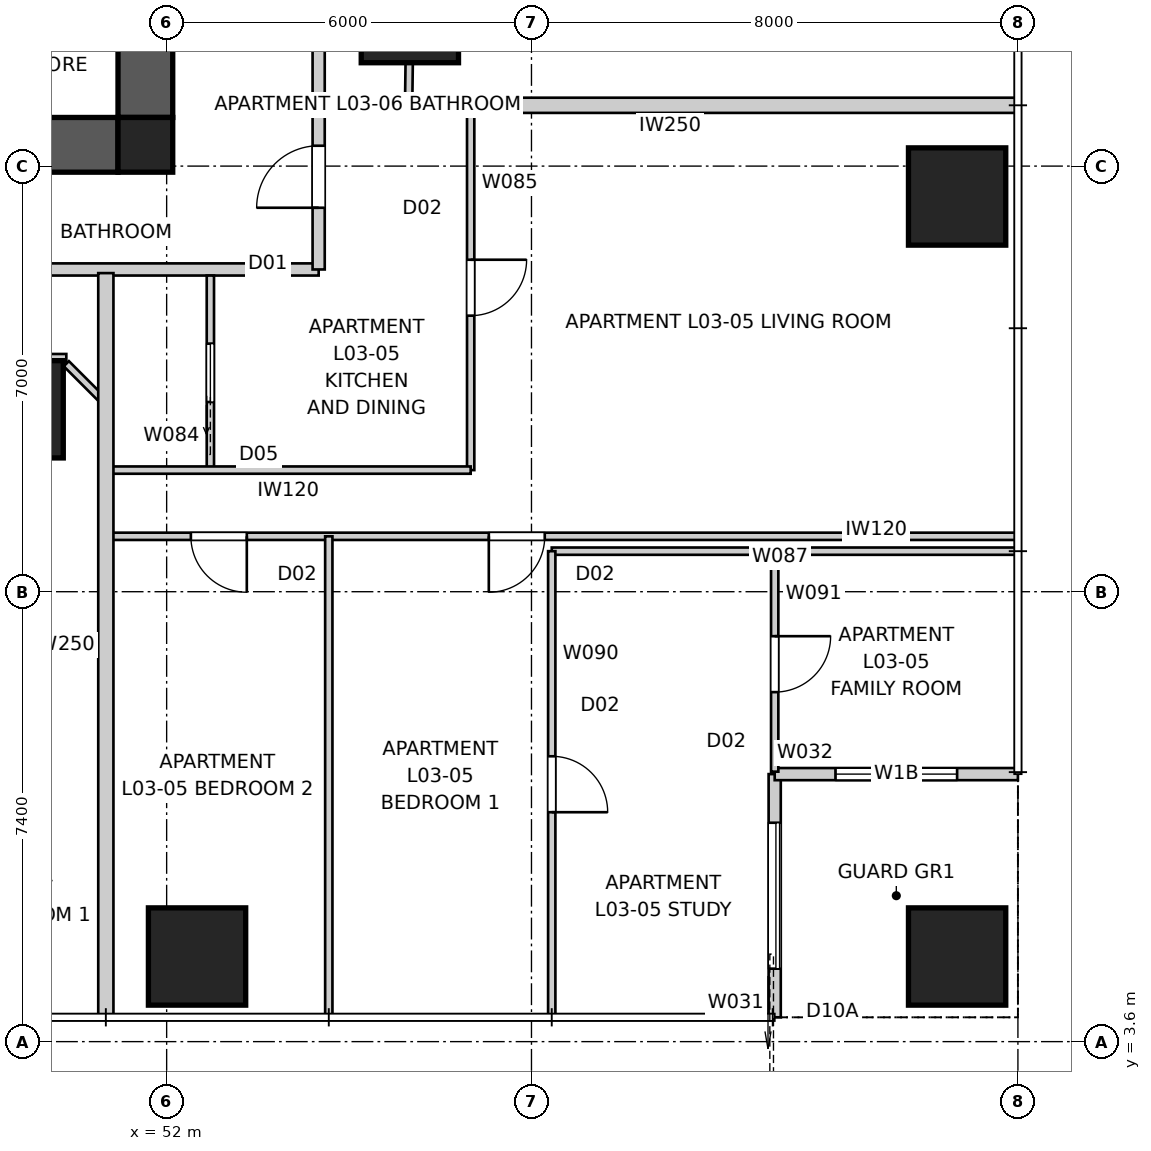
"""IFC4 building model, lengths in metres.
Left out: names, types, materials, properties, quantities, classifications, styles, units other than length and angle.
Written with IfcOpenShell. Run it as: python <this file> out.ifc"""

import sys

from ifc_helpers import new_model, si_unit, direction, frame, frame_2d, origin, origin_2d, place, context, subcontext, project, spatial, polyline, rectangle, outline, extrude, element, fill, save


model = new_model("IFC4")
c1 = context("Model", 3, precision=1e-05, world=origin(), true_north=direction((0.0, 1.0)))
c2 = subcontext(c1, "Body", "Model", "MODEL_VIEW")
j1 = project(units=[si_unit("LENGTHUNIT", "METRE"), si_unit("PLANEANGLEUNIT", "RADIAN")], contexts=[c1])
p1 = place(None, origin())
s1 = spatial("IfcSite", under=j1, at=p1, CompositionType="ELEMENT")
p2 = place(p1, origin())
s2 = spatial("IfcBuilding", under=s1, at=p2, CompositionType="ELEMENT")
p3 = place(p2, frame((0.0, 0.0, 15.0)))
s3 = spatial("IfcBuildingStorey", under=s2, at=p3, CompositionType="ELEMENT", Elevation=15.0)
p4 = place(p3, frame((51.2, 18.35, 0.0), z_axis=(0.0, 0.0, 1.0), x_axis=(-1.0, 0.0, 0.0)))
e1 = element("IfcWall", 1, at=p4, inside=s3, PredefinedType="SHEAR", context=c2, shape_type="SweptSolid", body=[
    extrude(outline(polyline([(0.0, -0.45), (22.4, -0.45), (22.4, -0.025), (22.85, -0.025), (22.85, 0.025), (22.4, 0.025), (22.4, 0.45), (0.0, 0.45), (0.0, 0.025), (-0.45, 0.025), (-0.45, -0.025), (0.0, -0.025), (0.0, -0.45)])), origin(), (0.0, 0.0, 1.0), 3.4),
])
p5 = place(p3, frame((51.65, 18.8, 0.0), z_axis=(0.0, 0.0, 1.0), x_axis=(0.0, 1.0, 0.0)))
e2 = element("IfcWall", 2, at=p5, inside=s3, PredefinedType="SHEAR", context=c2, shape_type="SweptSolid", body=[
    extrude(outline(polyline([(0.0, -0.45), (22.4, -0.45), (22.4, -0.025), (22.85, -0.025), (22.85, 0.025), (22.4, 0.025), (22.4, 0.45), (0.0, 0.45), (0.0, 0.025), (-0.45, 0.025), (-0.45, -0.025), (0.0, -0.025), (0.0, -0.45)])), origin(), (0.0, 0.0, 1.0), 3.4),
])
p6 = place(p5, frame((11.14, 0.0, 0.0)))
e3 = element("IfcOpeningElement", 3, at=p6, cuts=e2, PredefinedType="OPENING", context=c2, shape_type="SweptSolid", body=[
    extrude(rectangle(XDim=1.02, YDim=2.4, at=frame_2d((0.51, 1.2))), frame((0.0, 0.46, 0.0), z_axis=(0.0, -1.0, 0.0), x_axis=(1.0, 0.0, 0.0)), (0.0, 0.0, 1.0), 0.92),
])
p7 = place(p3, frame((51.65, 18.35, 0.0), z_axis=(0.0, 0.0, 1.0), x_axis=(1.0, 0.0, 0.0)))
e4 = element("IfcColumn", 4, at=p7, inside=s3, PredefinedType="COLUMN", context=c2, shape_type="SweptSolid", body=[
    extrude(rectangle(XDim=0.9, YDim=0.9, at=origin_2d()), origin(), (0.0, 0.0, 1.0), 3.4),
])
for number, where, z_axis, x_axis in (
    (5, (52.5, 5.0, 0.0), (0.0, 0.0, 1.0), (1.0, 0.0, 0.0)),
    (6, (65.0, 5.0, 0.0), (0.0, 0.0, 1.0), (1.0, 0.0, 0.0)),
    (7, (65.0, 17.5, 0.0), (0.0, 0.0, 1.0), (1.0, 0.0, 0.0)),
    (8, (49.5, 14.0, 0.0), (0.0, 0.0, 1.0), (1.0, 0.0, 0.0)),
    (9, (56.0, 20.5, 0.0), (0.0, 0.0, 1.0), (1.0, 0.0, 0.0)),
):
    element("IfcColumn", number, at=place(p3, frame(where, z_axis=z_axis, x_axis=x_axis)), inside=s3, PredefinedType="COLUMN", context=c2, shape_type="SweptSolid", body=[
        extrude(rectangle(XDim=1.6, YDim=1.6, at=origin_2d()), origin(), (0.0, 0.0, 1.0), 3.4),
    ])
p8 = place(p3, frame((62.0, 4.0, 0.0), z_axis=(0.0, 0.0, 1.0), x_axis=(0.0, 1.0, 0.0)))
e10 = element("IfcWall", 10, at=p8, inside=s3, PredefinedType="SOLIDWALL", context=c2, shape_type="SweptSolid", body=[
    extrude(rectangle(XDim=4.0, YDim=0.2, at=frame_2d((2.0, 0.0))), origin(), (0.0, 0.0, 1.0), 3.25),
])
p9 = place(p8, frame((0.8, 0.0, 0.0)))
e11 = element("IfcOpeningElement", 11, at=p9, cuts=e10, PredefinedType="OPENING", context=c2, shape_type="SweptSolid", body=[
    extrude(rectangle(XDim=2.4, YDim=2.1, at=frame_2d((1.2, 1.05))), frame((0.0, 0.11, 0.0), z_axis=(0.0, -1.0, 0.0), x_axis=(1.0, 0.0, 0.0)), (0.0, 0.0, 1.0), 0.22),
])
p10 = place(p3, frame((62.0, 8.0, 0.0), z_axis=(0.0, 0.0, 1.0), x_axis=(1.0, 0.0, 0.0)))
e12 = element("IfcWall", 12, at=p10, inside=s3, PredefinedType="SOLIDWALL", context=c2, shape_type="SweptSolid", body=[
    extrude(rectangle(XDim=4.0, YDim=0.2, at=frame_2d((2.0, 0.0))), origin(), (0.0, 0.0, 1.0), 3.25),
])
p11 = place(p10, frame((1.0, 0.0, 0.45)))
e13 = element("IfcOpeningElement", 13, at=p11, cuts=e12, PredefinedType="OPENING", context=c2, shape_type="SweptSolid", body=[
    extrude(rectangle(XDim=2.0, YDim=1.8, at=frame_2d((1.0, 0.9))), frame((0.0, 0.11, 0.0), z_axis=(0.0, -1.0, 0.0), x_axis=(1.0, 0.0, 0.0)), (0.0, 0.0, 1.0), 0.22),
])
p12 = place(p3, frame((25.5, 16.3, 0.0), z_axis=(0.0, 0.0, 1.0), x_axis=(1.0, 0.0, 0.0)))
e14 = element("IfcWall", 14, at=p12, inside=s3, PredefinedType="PARTITIONING", context=c2, shape_type="SweptSolid", body=[
    extrude(rectangle(XDim=29.0, YDim=0.2, at=frame_2d((14.5, 0.0))), origin(), (0.0, 0.0, 1.0), 3.25),
])
p13 = place(p12, frame((18.734, 0.0, 0.0)))
e15 = element("IfcOpeningElement", 15, at=p13, cuts=e14, PredefinedType="OPENING", context=c2, shape_type="SweptSolid", body=[
    extrude(rectangle(XDim=1.02, YDim=2.34, at=frame_2d((0.51, 1.17))), frame((0.0, 0.11, 0.0), z_axis=(0.0, -1.0, 0.0), x_axis=(1.0, 0.0, 0.0)), (0.0, 0.0, 1.0), 0.22),
])
p14 = place(p12, frame((5.096, 0.0, 0.0)))
e16 = element("IfcOpeningElement", 16, at=p14, cuts=e14, PredefinedType="OPENING", context=c2, shape_type="SweptSolid", body=[
    extrude(rectangle(XDim=1.02, YDim=2.34, at=frame_2d((0.51, 1.17))), frame((0.0, 0.11, 0.0), z_axis=(0.0, -1.0, 0.0), x_axis=(1.0, 0.0, 0.0)), (0.0, 0.0, 1.0), 0.22),
])
p15 = place(p12, frame((0.815, 0.0, 0.0)))
e17 = element("IfcOpeningElement", 17, at=p15, cuts=e14, PredefinedType="OPENING", context=c2, shape_type="SweptSolid", body=[
    extrude(rectangle(XDim=1.02, YDim=2.1, at=frame_2d((0.51, 1.05))), frame((0.0, 0.11, 0.0), z_axis=(0.0, -1.0, 0.0), x_axis=(1.0, 0.0, 0.0)), (0.0, 0.0, 1.0), 0.22),
])
p16 = place(p3, frame((54.5, 16.3, 0.0), z_axis=(0.0, 0.0, 1.0), x_axis=(0.0, 1.0, 0.0)))
e18 = element("IfcWall", 18, at=p16, inside=s3, PredefinedType="PARTITIONING", context=c2, shape_type="SweptSolid", body=[
    extrude(rectangle(XDim=27.4, YDim=0.2, at=frame_2d((13.7, 0.0))), origin(), (0.0, 0.0, 1.0), 3.25),
])
p17 = place(p16, frame((20.998, 0.0, 0.0)))
e19 = element("IfcOpeningElement", 19, at=p17, cuts=e18, PredefinedType="OPENING", context=c2, shape_type="SweptSolid", body=[
    extrude(rectangle(XDim=1.02, YDim=2.34, at=frame_2d((0.51, 1.17))), frame((0.0, 0.11, 0.0), z_axis=(0.0, -1.0, 0.0), x_axis=(1.0, 0.0, 0.0)), (0.0, 0.0, 1.0), 0.22),
])
p18 = place(p16, frame((11.119, 0.0, 0.0)))
e20 = element("IfcOpeningElement", 20, at=p18, cuts=e18, PredefinedType="OPENING", context=c2, shape_type="SweptSolid", body=[
    extrude(rectangle(XDim=1.02, YDim=2.34, at=frame_2d((0.51, 1.17))), frame((0.0, 0.11, 0.0), z_axis=(0.0, -1.0, 0.0), x_axis=(1.0, 0.0, 0.0)), (0.0, 0.0, 1.0), 0.22),
])
p19 = place(p16, frame((1.015, 0.0, 0.0)))
e21 = element("IfcOpeningElement", 21, at=p19, cuts=e18, PredefinedType="OPENING", context=c2, shape_type="SweptSolid", body=[
    extrude(rectangle(XDim=1.02, YDim=2.34, at=frame_2d((0.51, 1.17))), frame((0.0, 0.11, 0.0), z_axis=(0.0, -1.0, 0.0), x_axis=(1.0, 0.0, 0.0)), (0.0, 0.0, 1.0), 0.22),
])
p20 = place(p3, frame((51.0, 4.0, 0.0), z_axis=(0.0, 0.0, 1.0), x_axis=(0.0, 1.0, 0.0)))
e22 = element("IfcWall", 22, at=p20, inside=s3, PredefinedType="PARTITIONING", context=c2, shape_type="SweptSolid", body=[
    extrude(rectangle(XDim=12.24, YDim=0.25, at=frame_2d((6.12, 0.0))), origin(), (0.0, 0.0, 1.0), 3.25),
])
p21 = place(p3, frame((66.0, 19.0, 0.0), z_axis=(0.0, 0.0, 1.0), x_axis=(-1.0, 0.0, 0.0)))
e23 = element("IfcWall", 23, at=p21, inside=s3, PredefinedType="PARTITIONING", context=c2, shape_type="SweptSolid", body=[
    extrude(rectangle(XDim=11.44, YDim=0.25, at=frame_2d((5.72, 0.0))), origin(), (0.0, 0.0, 1.0), 3.25),
])
p22 = place(p3, frame((51.0, 14.1, 0.0), z_axis=(0.0, 0.0, 1.0), x_axis=(-0.707106781187, 0.707106781187, 0.0)))
e24 = element("IfcWall", 24, at=p22, inside=s3, PredefinedType="PARTITIONING", context=c2, shape_type="SweptSolid", body=[
    extrude(rectangle(XDim=0.919, YDim=0.12, at=frame_2d((0.459, 0.0))), origin(), (0.0, 0.0, 1.0), 3.25),
])
p23 = place(p3, frame((50.35, 14.85, 0.0), z_axis=(0.0, 0.0, 1.0), x_axis=(-1.0, 0.0, 0.0)))
e25 = element("IfcWall", 25, at=p23, inside=s3, PredefinedType="PARTITIONING", context=c2, shape_type="SweptSolid", body=[
    extrude(rectangle(XDim=1.7, YDim=0.12, at=frame_2d((0.85, 0.0))), origin(), (0.0, 0.0, 1.0), 3.25),
])
p24 = place(p3, frame((52.719, 13.0, 0.0), z_axis=(0.0, 0.0, 1.0), x_axis=(0.0, 1.0, 0.0)))
e26 = element("IfcWall", 26, at=p24, inside=s3, PredefinedType="PARTITIONING", context=c2, shape_type="SweptSolid", body=[
    extrude(rectangle(XDim=3.2, YDim=0.12, at=frame_2d((1.6, 0.0))), origin(), (0.0, 0.0, 1.0), 3.25),
])
p25 = place(p24, frame((1.12, 0.0, 0.0)))
e27 = element("IfcOpeningElement", 27, at=p25, cuts=e26, PredefinedType="OPENING", context=c2, shape_type="SweptSolid", body=[
    extrude(rectangle(XDim=0.96, YDim=2.1, at=frame_2d((0.48, 1.05))), frame((0.0, 0.07, 0.0), z_axis=(0.0, -1.0, 0.0), x_axis=(1.0, 0.0, 0.0)), (0.0, 0.0, 1.0), 0.14),
])
p26 = place(p3, frame((57.0, 19.0, 0.0), z_axis=(0.0, 0.0, 1.0), x_axis=(0.0, -1.0, 0.0)))
e28 = element("IfcWall", 28, at=p26, inside=s3, PredefinedType="PARTITIONING", context=c2, shape_type="SweptSolid", body=[
    extrude(rectangle(XDim=6.0, YDim=0.12, at=frame_2d((3.0, 0.0))), origin(), (0.0, 0.0, 1.0), 3.25),
])
p27 = place(p26, frame((2.54, 0.0, 0.0)))
e29 = element("IfcOpeningElement", 29, at=p27, cuts=e28, PredefinedType="OPENING", context=c2, shape_type="SweptSolid", body=[
    extrude(rectangle(XDim=0.92, YDim=2.34, at=frame_2d((0.46, 1.17))), frame((0.0, 0.07, 0.0), z_axis=(0.0, -1.0, 0.0), x_axis=(1.0, 0.0, 0.0)), (0.0, 0.0, 1.0), 0.14),
])
p28 = place(p3, frame((57.0, 13.0, 0.0), z_axis=(0.0, 0.0, 1.0), x_axis=(-1.0, 0.0, 0.0)))
e30 = element("IfcWall", 30, at=p28, inside=s3, PredefinedType="PARTITIONING", context=c2, shape_type="SweptSolid", body=[
    extrude(rectangle(XDim=6.0, YDim=0.12, at=frame_2d((3.0, 0.0))), origin(), (0.0, 0.0, 1.0), 3.25),
])
p29 = place(p3, frame((65.96, 11.911, 0.0), z_axis=(0.0, 0.0, 1.0), x_axis=(-1.0, 0.0, 0.0)))
e31 = element("IfcWall", 31, at=p29, inside=s3, PredefinedType="PARTITIONING", context=c2, shape_type="SweptSolid", body=[
    extrude(rectangle(XDim=14.96, YDim=0.12, at=frame_2d((7.48, 0.0))), origin(), (0.0, 0.0, 1.0), 3.25),
])
p30 = place(p29, frame((7.742, 0.0, 0.0)))
e32 = element("IfcOpeningElement", 32, at=p30, cuts=e31, PredefinedType="OPENING", context=c2, shape_type="SweptSolid", body=[
    extrude(rectangle(XDim=0.92, YDim=2.34, at=frame_2d((0.46, 1.17))), frame((0.0, 0.07, 0.0), z_axis=(0.0, -1.0, 0.0), x_axis=(1.0, 0.0, 0.0)), (0.0, 0.0, 1.0), 0.14),
])
p31 = place(p29, frame((12.642, 0.0, 0.0)))
e33 = element("IfcOpeningElement", 33, at=p31, cuts=e31, PredefinedType="OPENING", context=c2, shape_type="SweptSolid", body=[
    extrude(rectangle(XDim=0.92, YDim=2.34, at=frame_2d((0.46, 1.17))), frame((0.0, 0.07, 0.0), z_axis=(0.0, -1.0, 0.0), x_axis=(1.0, 0.0, 0.0)), (0.0, 0.0, 1.0), 0.14),
])
p32 = place(p3, frame((54.667, 4.04, 0.0), z_axis=(0.0, 0.0, 1.0), x_axis=(0.0, 1.0, 0.0)))
e34 = element("IfcWall", 34, at=p32, inside=s3, PredefinedType="PARTITIONING", context=c2, shape_type="SweptSolid", body=[
    extrude(rectangle(XDim=7.871, YDim=0.12, at=frame_2d((3.936, 0.0))), origin(), (0.0, 0.0, 1.0), 2.637),
])
p33 = place(p3, frame((65.96, 11.667, 0.0), z_axis=(0.0, 0.0, 1.0), x_axis=(-1.0, 0.0, 0.0)))
e35 = element("IfcWall", 35, at=p33, inside=s3, PredefinedType="PARTITIONING", context=c2, shape_type="SweptSolid", body=[
    extrude(rectangle(XDim=7.627, YDim=0.12, at=frame_2d((3.813, 0.0))), origin(), (0.0, 0.0, 1.0), 3.25),
])
p34 = place(p3, frame((58.333, 11.667, 0.0), z_axis=(0.0, 0.0, 1.0), x_axis=(0.0, -1.0, 0.0)))
e36 = element("IfcWall", 36, at=p34, inside=s3, PredefinedType="PARTITIONING", context=c2, shape_type="SweptSolid", body=[
    extrude(rectangle(XDim=7.627, YDim=0.12, at=frame_2d((3.813, 0.0))), origin(), (0.0, 0.0, 1.0), 3.25),
])
p35 = place(p34, frame((3.373, 0.0, 0.0)))
e37 = element("IfcOpeningElement", 37, at=p35, cuts=e36, PredefinedType="OPENING", context=c2, shape_type="SweptSolid", body=[
    extrude(rectangle(XDim=0.92, YDim=2.34, at=frame_2d((0.46, 1.17))), frame((0.0, 0.07, 0.0), z_axis=(0.0, -1.0, 0.0), x_axis=(1.0, 0.0, 0.0)), (0.0, 0.0, 1.0), 0.14),
])
p36 = place(p3, frame((62.0, 11.667, 0.0), z_axis=(0.0, 0.0, 1.0), x_axis=(0.0, -1.0, 0.0)))
e38 = element("IfcWall", 38, at=p36, inside=s3, PredefinedType="PARTITIONING", context=c2, shape_type="SweptSolid", body=[
    extrude(rectangle(XDim=3.627, YDim=0.12, at=frame_2d((1.813, 0.0))), origin(), (0.0, 0.0, 1.0), 3.25),
])
p37 = place(p36, frame((1.398, 0.0, 0.0)))
e39 = element("IfcOpeningElement", 39, at=p37, cuts=e38, PredefinedType="OPENING", context=c2, shape_type="SweptSolid", body=[
    extrude(rectangle(XDim=0.92, YDim=2.34, at=frame_2d((0.46, 1.17))), frame((0.0, 0.07, 0.0), z_axis=(0.0, -1.0, 0.0), x_axis=(1.0, 0.0, 0.0)), (0.0, 0.0, 1.0), 0.14),
])
p38 = place(p3, frame((56.029, 22.649, 0.0), z_axis=(0.0, 0.0, 1.0), x_axis=(-0.013648778697, -0.999906851082, 0.0)))
e40 = element("IfcWall", 40, at=p38, inside=s3, PredefinedType="PARTITIONING", context=c2, shape_type="SweptSolid", body=[
    extrude(rectangle(XDim=3.649, YDim=0.12, at=frame_2d((1.824, 0.0))), origin(), (0.0, 0.0, 1.0), 2.549),
])
p39 = place(p9, origin())
e41 = element("IfcDoor", 41, at=p39, inside=s3, OperationType="SLIDING_TO_LEFT", PredefinedType="DOOR", context=c2, shape_type="SweptSolid", body=[
    extrude(rectangle(XDim=2.4, YDim=2.1, at=frame_2d((1.2, 1.05))), frame((0.0, 0.025, 0.0), z_axis=(0.0, -1.0, 0.0), x_axis=(1.0, 0.0, 0.0)), (0.0, 0.0, 1.0), 0.05),
])
fill(e11, e41)
p40 = place(p11, origin())
e42 = element("IfcWindow", 42, at=p40, inside=s3, PartitioningType="SINGLE_PANEL", PredefinedType="WINDOW", context=c2, shape_type="SweptSolid", body=[
    extrude(rectangle(XDim=2.0, YDim=1.8, at=frame_2d((1.0, 0.9))), frame((0.0, 0.03, 0.0), z_axis=(0.0, -1.0, 0.0), x_axis=(1.0, 0.0, 0.0)), (0.0, 0.0, 1.0), 0.06),
])
fill(e13, e42)
p41 = place(p19, origin())
e43 = element("IfcDoor", 43, at=p41, inside=s3, OperationType="SINGLE_SWING_LEFT", PredefinedType="DOOR", context=c2, shape_type="SweptSolid", body=[
    extrude(rectangle(XDim=1.02, YDim=2.34, at=frame_2d((0.51, 1.17))), frame((0.0, 0.025, 0.0), z_axis=(0.0, -1.0, 0.0), x_axis=(1.0, 0.0, 0.0)), (0.0, 0.0, 1.0), 0.05),
])
fill(e21, e43)
p42 = place(p27, origin())
e44 = element("IfcDoor", 44, at=p42, inside=s3, OperationType="SINGLE_SWING_LEFT", PredefinedType="DOOR", context=c2, shape_type="SweptSolid", body=[
    extrude(rectangle(XDim=0.92, YDim=2.34, at=frame_2d((0.46, 1.17))), frame((0.0, 0.025, 0.0), z_axis=(0.0, -1.0, 0.0), x_axis=(1.0, 0.0, 0.0)), (0.0, 0.0, 1.0), 0.05),
])
fill(e29, e44)
p43 = place(p25, origin())
e45 = element("IfcDoor", 45, at=p43, inside=s3, OperationType="SLIDING_TO_LEFT", PredefinedType="DOOR", context=c2, shape_type="SweptSolid", body=[
    extrude(rectangle(XDim=0.96, YDim=2.1, at=frame_2d((0.48, 1.05))), frame((0.0, 0.025, 0.0), z_axis=(0.0, -1.0, 0.0), x_axis=(1.0, 0.0, 0.0)), (0.0, 0.0, 1.0), 0.05),
])
fill(e27, e45)
p44 = place(p30, origin())
e46 = element("IfcDoor", 46, at=p44, inside=s3, OperationType="SINGLE_SWING_RIGHT", PredefinedType="DOOR", context=c2, shape_type="SweptSolid", body=[
    extrude(rectangle(XDim=0.92, YDim=2.34, at=frame_2d((0.46, 1.17))), frame((0.0, 0.025, 0.0), z_axis=(0.0, -1.0, 0.0), x_axis=(1.0, 0.0, 0.0)), (0.0, 0.0, 1.0), 0.05),
])
fill(e32, e46)
p45 = place(p31, origin())
e47 = element("IfcDoor", 47, at=p45, inside=s3, OperationType="SINGLE_SWING_LEFT", PredefinedType="DOOR", context=c2, shape_type="SweptSolid", body=[
    extrude(rectangle(XDim=0.92, YDim=2.34, at=frame_2d((0.46, 1.17))), frame((0.0, 0.025, 0.0), z_axis=(0.0, -1.0, 0.0), x_axis=(1.0, 0.0, 0.0)), (0.0, 0.0, 1.0), 0.05),
])
fill(e33, e47)
p46 = place(p35, origin())
e48 = element("IfcDoor", 48, at=p46, inside=s3, OperationType="SINGLE_SWING_RIGHT", PredefinedType="DOOR", context=c2, shape_type="SweptSolid", body=[
    extrude(rectangle(XDim=0.92, YDim=2.34, at=frame_2d((0.46, 1.17))), frame((0.0, 0.025, 0.0), z_axis=(0.0, -1.0, 0.0), x_axis=(1.0, 0.0, 0.0)), (0.0, 0.0, 1.0), 0.05),
])
fill(e37, e48)
p47 = place(p37, origin())
e49 = element("IfcDoor", 49, at=p47, inside=s3, OperationType="SINGLE_SWING_LEFT", PredefinedType="DOOR", context=c2, shape_type="SweptSolid", body=[
    extrude(rectangle(XDim=0.92, YDim=2.34, at=frame_2d((0.46, 1.17))), frame((0.0, 0.025, 0.0), z_axis=(0.0, -1.0, 0.0), x_axis=(1.0, 0.0, 0.0)), (0.0, 0.0, 1.0), 0.05),
])
fill(e39, e49)
save(model, sys.argv[1])
